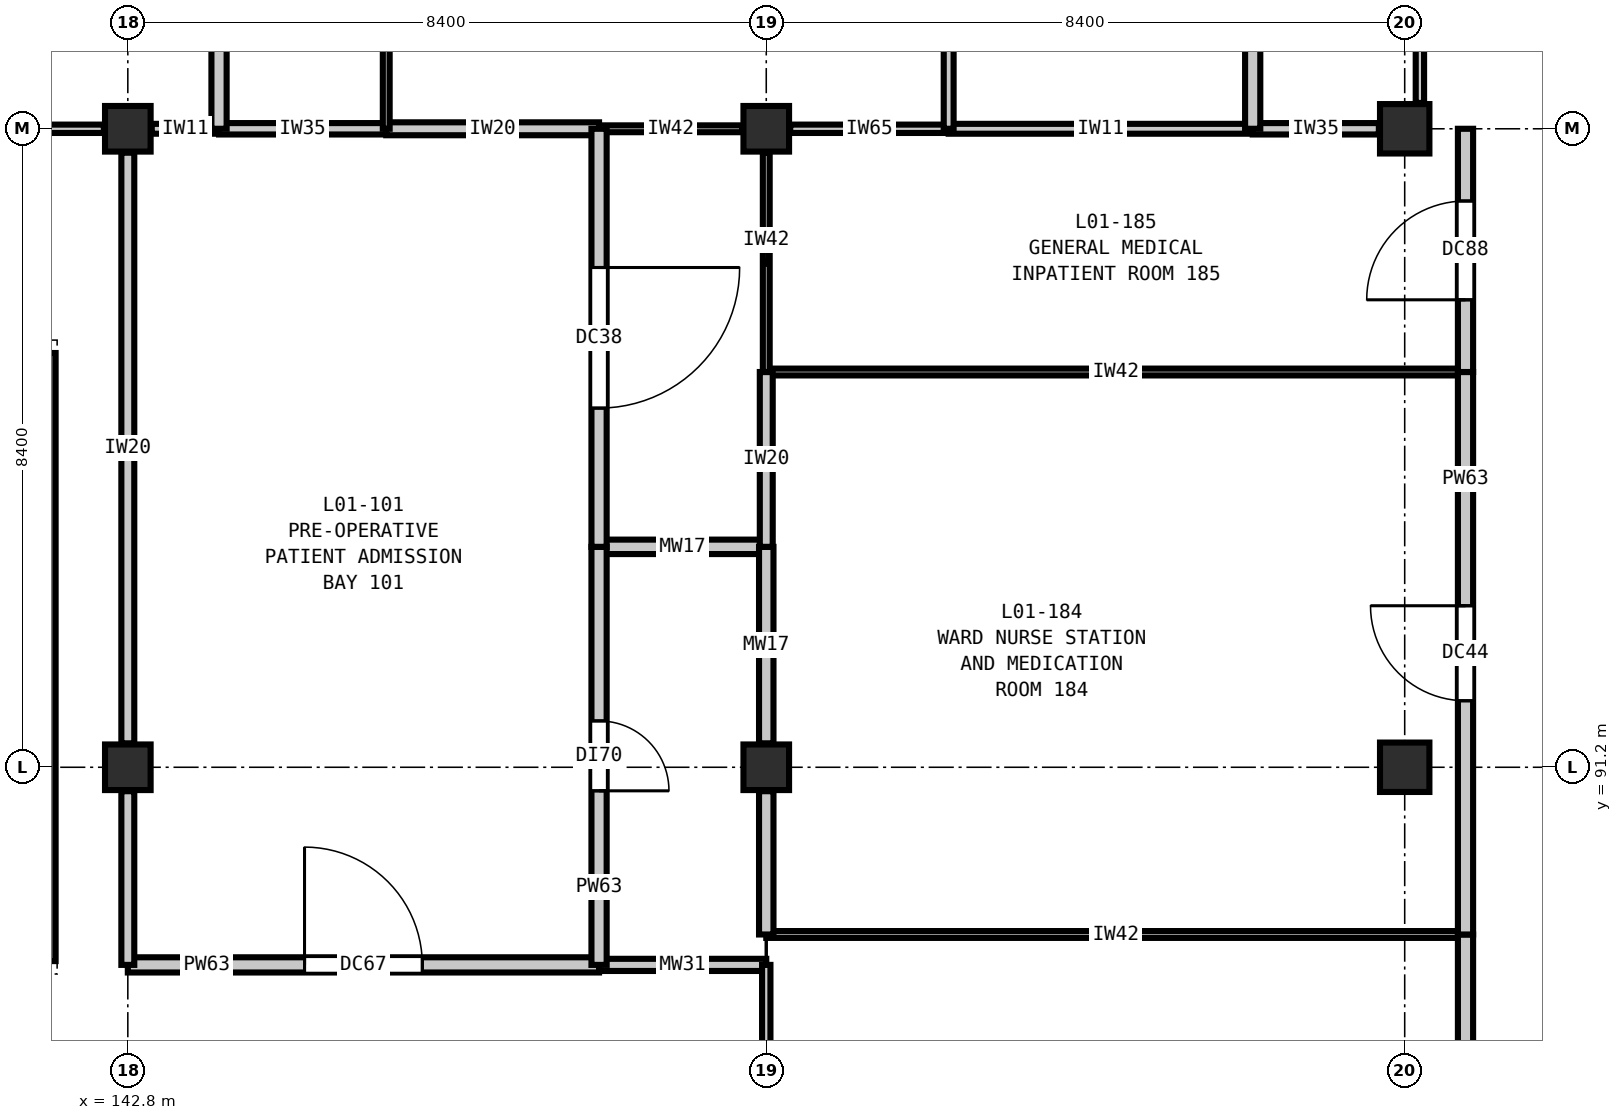
"""IFC4 building model, lengths in metres.
Left out: names, types, materials, properties, quantities, classifications, styles, units other than length and angle.
Written with IfcOpenShell. Run it as: python <this file> out.ifc"""

import sys

from ifc_helpers import new_model, si_unit, direction, frame, frame_2d, origin, origin_2d, place, context, subcontext, project, spatial, rectangle, extrude, element, fill, save


model = new_model("IFC4")
c1 = context("Model", 3, precision=1e-05, world=origin(), true_north=direction((0.0, 1.0)))
c2 = subcontext(c1, "Body", "Model", "MODEL_VIEW")
j1 = project(units=[si_unit("LENGTHUNIT", "METRE"), si_unit("PLANEANGLEUNIT", "RADIAN")], contexts=[c1])
p1 = place(None, origin())
s1 = spatial("IfcSite", under=j1, at=p1, CompositionType="ELEMENT")
p2 = place(p1, origin())
s2 = spatial("IfcBuilding", under=s1, at=p2, CompositionType="ELEMENT")
p3 = place(p2, frame((0.0, 0.0, 5.4)))
s3 = spatial("IfcBuildingStorey", under=s2, at=p3, CompositionType="ELEMENT", Elevation=5.4)
for number, where, z_axis, x_axis in (
    (1, (142.8, 91.2, 0.0), (0.0, 0.0, 1.0), (1.0, 0.0, 0.0)),
    (2, (142.8, 99.6, 0.0), (0.0, 0.0, 1.0), (1.0, 0.0, 0.0)),
    (3, (151.2, 91.2, 0.0), (0.0, 0.0, 1.0), (1.0, 0.0, 0.0)),
    (4, (151.2, 99.6, 0.0), (0.0, 0.0, 1.0), (1.0, 0.0, 0.0)),
):
    element("IfcColumn", number, at=place(p3, frame(where, z_axis=z_axis, x_axis=x_axis)), inside=s3, PredefinedType="COLUMN", context=c2, shape_type="SweptSolid", body=[
        extrude(rectangle(XDim=0.6, YDim=0.6, at=origin_2d()), origin(), (0.0, 0.0, 1.0), 5.4),
    ])
for number, where, z_axis, x_axis in (
    (5, (159.6, 91.2, 0.0), (0.0, 0.0, 1.0), (1.0, 0.0, 0.0)),
    (6, (159.6, 99.6, 0.0), (0.0, 0.0, 1.0), (1.0, 0.0, 0.0)),
):
    element("IfcColumn", number, at=place(p3, frame(where, z_axis=z_axis, x_axis=x_axis)), inside=s3, PredefinedType="COLUMN", context=c2, shape_type="SweptSolid", body=[
        extrude(rectangle(XDim=0.65, YDim=0.65, at=origin_2d()), origin(), (0.0, 0.0, 1.0), 5.4),
    ])
p4 = place(p3, frame((141.7, 88.65, 0.0), z_axis=(0.0, 0.0, 1.0), x_axis=(0.0, 1.0, 0.0)))
e7 = element("IfcWall", 7, at=p4, inside=s3, PredefinedType="SHEAR", context=c2, shape_type="SweptSolid", body=[
    extrude(rectangle(XDim=8.0, YDim=0.3, at=frame_2d((4.0, 0.0))), origin(), (0.0, 0.0, 1.0), 5.4),
])
p5 = place(p3, frame((142.8, 88.6, 0.0), z_axis=(0.0, 0.0, 1.0), x_axis=(1.0, 0.0, 0.0)))
e8 = element("IfcWall", 8, at=p5, inside=s3, PredefinedType="PARTITIONING", context=c2, shape_type="SweptSolid", body=[
    extrude(rectangle(XDim=6.2, YDim=0.2, at=frame_2d((3.1, 0.0))), origin(), (0.0, 0.0, 1.0), 5.05),
])
p6 = place(p5, frame((2.325, 0.0, 0.0)))
e9 = element("IfcOpeningElement", 9, at=p6, cuts=e8, PredefinedType="OPENING", context=c2, shape_type="SweptSolid", body=[
    extrude(rectangle(XDim=1.55, YDim=2.25, at=frame_2d((0.775, 1.125))), frame((0.0, 0.11, 0.0), z_axis=(0.0, -1.0, 0.0), x_axis=(1.0, 0.0, 0.0)), (0.0, 0.0, 1.0), 0.22),
])
p7 = place(p3, frame((149.0, 88.6, 0.0), z_axis=(0.0, 0.0, 1.0), x_axis=(1.0, 0.0, 0.0)))
e10 = element("IfcWall", 10, at=p7, inside=s3, PredefinedType="PLUMBINGWALL", context=c2, shape_type="SweptSolid", body=[
    extrude(rectangle(XDim=2.2, YDim=0.16, at=frame_2d((1.1, 0.0))), origin(), (0.0, 0.0, 1.0), 5.05),
])
p8 = place(p3, frame((151.2, 89.0, 0.0), z_axis=(0.0, 0.0, 1.0), x_axis=(1.0, 0.0, 0.0)))
e11 = element("IfcWall", 11, at=p8, inside=s3, PredefinedType="PARTITIONING", context=c2, shape_type="SweptSolid", body=[
    extrude(rectangle(XDim=9.2, YDim=0.09, at=frame_2d((4.6, 0.0))), origin(), (0.0, 0.0, 1.0), 5.05),
])
p9 = place(p3, frame((149.0, 94.1, 0.0), z_axis=(0.0, 0.0, 1.0), x_axis=(1.0, 0.0, 0.0)))
e12 = element("IfcWall", 12, at=p9, inside=s3, PredefinedType="PLUMBINGWALL", context=c2, shape_type="SweptSolid", body=[
    extrude(rectangle(XDim=2.2, YDim=0.19, at=frame_2d((1.1, 0.0))), origin(), (0.0, 0.0, 1.0), 5.05),
])
p10 = place(p3, frame((151.2, 96.4, 0.0), z_axis=(0.0, 0.0, 1.0), x_axis=(1.0, 0.0, 0.0)))
e13 = element("IfcWall", 13, at=p10, inside=s3, PredefinedType="PARTITIONING", context=c2, shape_type="SweptSolid", body=[
    extrude(rectangle(XDim=9.2, YDim=0.09, at=frame_2d((4.6, 0.0))), origin(), (0.0, 0.0, 1.0), 5.05),
])
p11 = place(p3, frame((140.0, 99.6, 0.0), z_axis=(0.0, 0.0, 1.0), x_axis=(1.0, 0.0, 0.0)))
e14 = element("IfcWall", 14, at=p11, inside=s3, PredefinedType="PARTITIONING", context=c2, shape_type="SweptSolid", body=[
    extrude(rectangle(XDim=2.485, YDim=0.11, at=frame_2d((1.243, 0.0))), origin(), (0.0, 0.0, 1.0), 4.685),
])
p12 = place(p3, frame((143.115, 99.6, 0.0), z_axis=(0.0, 0.0, 1.0), x_axis=(1.0, 0.0, 0.0)))
e15 = element("IfcWall", 15, at=p12, inside=s3, PredefinedType="PARTITIONING", context=c2, shape_type="SweptSolid", body=[
    extrude(rectangle(XDim=0.885, YDim=0.13, at=frame_2d((0.442, 0.0))), origin(), (0.0, 0.0, 1.0), 4.685),
])
p13 = place(p3, frame((144.0, 99.6, 0.0), z_axis=(0.0, 0.0, 1.0), x_axis=(1.0, 0.0, 0.0)))
e16 = element("IfcWall", 16, at=p13, inside=s3, PredefinedType="PARTITIONING", context=c2, shape_type="SweptSolid", body=[
    extrude(rectangle(XDim=2.2, YDim=0.15, at=frame_2d((1.1, 0.0))), origin(), (0.0, 0.0, 1.0), 4.685),
])
p14 = place(p3, frame((146.2, 99.6, 0.0), z_axis=(0.0, 0.0, 1.0), x_axis=(1.0, 0.0, 0.0)))
e17 = element("IfcWall", 17, at=p14, inside=s3, PredefinedType="PARTITIONING", context=c2, shape_type="SweptSolid", body=[
    extrude(rectangle(XDim=2.8, YDim=0.17, at=frame_2d((1.4, 0.0))), origin(), (0.0, 0.0, 1.0), 4.685),
])
p15 = place(p3, frame((149.0, 99.6, 0.0), z_axis=(0.0, 0.0, 1.0), x_axis=(1.0, 0.0, 0.0)))
e18 = element("IfcWall", 18, at=p15, inside=s3, PredefinedType="PARTITIONING", context=c2, shape_type="SweptSolid", body=[
    extrude(rectangle(XDim=1.885, YDim=0.09, at=frame_2d((0.942, 0.0))), origin(), (0.0, 0.0, 1.0), 4.685),
])
p16 = place(p3, frame((151.515, 99.6, 0.0), z_axis=(0.0, 0.0, 1.0), x_axis=(1.0, 0.0, 0.0)))
e19 = element("IfcWall", 19, at=p16, inside=s3, PredefinedType="PARTITIONING", context=c2, shape_type="SweptSolid", body=[
    extrude(rectangle(XDim=2.085, YDim=0.11, at=frame_2d((1.042, 0.0))), origin(), (0.0, 0.0, 1.0), 4.685),
])
p17 = place(p3, frame((153.6, 99.6, 0.0), z_axis=(0.0, 0.0, 1.0), x_axis=(1.0, 0.0, 0.0)))
e20 = element("IfcWall", 20, at=p17, inside=s3, PredefinedType="PARTITIONING", context=c2, shape_type="SweptSolid", body=[
    extrude(rectangle(XDim=4.0, YDim=0.13, at=frame_2d((2.0, 0.0))), origin(), (0.0, 0.0, 1.0), 4.685),
])
p18 = place(p3, frame((157.6, 99.6, 0.0), z_axis=(0.0, 0.0, 1.0), x_axis=(1.0, 0.0, 0.0)))
e21 = element("IfcWall", 21, at=p18, inside=s3, PredefinedType="PARTITIONING", context=c2, shape_type="SweptSolid", body=[
    extrude(rectangle(XDim=1.66, YDim=0.15, at=frame_2d((0.83, 0.0))), origin(), (0.0, 0.0, 1.0), 4.685),
])
p19 = place(p3, frame((142.8, 91.515, 0.0), z_axis=(0.0, 0.0, 1.0), x_axis=(0.0, 1.0, 0.0)))
e22 = element("IfcWall", 22, at=p19, inside=s3, PredefinedType="PARTITIONING", context=c2, shape_type="SweptSolid", body=[
    extrude(rectangle(XDim=7.77, YDim=0.17, at=frame_2d((3.885, 0.0))), origin(), (0.0, 0.0, 1.0), 4.735),
])
p20 = place(p3, frame((142.8, 88.6, 0.0), z_axis=(0.0, 0.0, 1.0), x_axis=(0.0, 1.0, 0.0)))
e23 = element("IfcWall", 23, at=p20, inside=s3, PredefinedType="PARTITIONING", context=c2, shape_type="SweptSolid", body=[
    extrude(rectangle(XDim=2.285, YDim=0.17, at=frame_2d((1.143, 0.0))), origin(), (0.0, 0.0, 1.0), 4.735),
])
p21 = place(p3, frame((144.0, 99.6, 0.0), z_axis=(0.0, 0.0, 1.0), x_axis=(0.0, 1.0, 0.0)))
e24 = element("IfcWall", 24, at=p21, inside=s3, PredefinedType="PARTITIONING", context=c2, shape_type="SweptSolid", body=[
    extrude(rectangle(XDim=6.8, YDim=0.2, at=frame_2d((3.4, 0.0))), origin(), (0.0, 0.0, 1.0), 5.05),
])
p22 = place(p21, frame((1.214, 0.0, 0.0)))
e25 = element("IfcOpeningElement", 25, at=p22, cuts=e24, PredefinedType="OPENING", context=c2, shape_type="SweptSolid", body=[
    extrude(rectangle(XDim=1.45, YDim=2.25, at=frame_2d((0.725, 1.125))), frame((0.0, 0.11, 0.0), z_axis=(0.0, -1.0, 0.0), x_axis=(1.0, 0.0, 0.0)), (0.0, 0.0, 1.0), 0.22),
])
p23 = place(p3, frame((146.2, 99.6, 0.0), z_axis=(0.0, 0.0, 1.0), x_axis=(0.0, 1.0, 0.0)))
e26 = element("IfcWall", 26, at=p23, inside=s3, PredefinedType="PARTITIONING", context=c2, shape_type="SweptSolid", body=[
    extrude(rectangle(XDim=6.8, YDim=0.09, at=frame_2d((3.4, 0.0))), origin(), (0.0, 0.0, 1.0), 5.05),
])
p24 = place(p3, frame((149.0, 88.6, 0.0), z_axis=(0.0, 0.0, 1.0), x_axis=(0.0, 1.0, 0.0)))
e27 = element("IfcWall", 27, at=p24, inside=s3, PredefinedType="PARTITIONING", context=c2, shape_type="SweptSolid", body=[
    extrude(rectangle(XDim=5.5, YDim=0.2, at=frame_2d((2.75, 0.0))), origin(), (0.0, 0.0, 1.0), 5.05),
])
p25 = place(p24, frame((2.29, 0.0, 0.0)))
e28 = element("IfcOpeningElement", 28, at=p25, cuts=e27, PredefinedType="OPENING", context=c2, shape_type="SweptSolid", body=[
    extrude(rectangle(XDim=0.92, YDim=2.1, at=frame_2d((0.46, 1.05))), frame((0.0, 0.11, 0.0), z_axis=(0.0, -1.0, 0.0), x_axis=(1.0, 0.0, 0.0)), (0.0, 0.0, 1.0), 0.22),
])
p26 = place(p3, frame((149.0, 94.1, 0.0), z_axis=(0.0, 0.0, 1.0), x_axis=(0.0, 1.0, 0.0)))
e29 = element("IfcWall", 29, at=p26, inside=s3, PredefinedType="PARTITIONING", context=c2, shape_type="SweptSolid", body=[
    extrude(rectangle(XDim=5.5, YDim=0.2, at=frame_2d((2.75, 0.0))), origin(), (0.0, 0.0, 1.0), 5.05),
])
p27 = place(p26, frame((1.825, 0.0, 0.0)))
e30 = element("IfcOpeningElement", 30, at=p27, cuts=e29, PredefinedType="OPENING", context=c2, shape_type="SweptSolid", body=[
    extrude(rectangle(XDim=1.85, YDim=2.3, at=frame_2d((0.925, 1.15))), frame((0.0, 0.11, 0.0), z_axis=(0.0, -1.0, 0.0), x_axis=(1.0, 0.0, 0.0)), (0.0, 0.0, 1.0), 0.22),
])
p28 = place(p3, frame((151.2, 85.8, 0.0), z_axis=(0.0, 0.0, 1.0), x_axis=(0.0, 1.0, 0.0)))
e31 = element("IfcWall", 31, at=p28, inside=s3, PredefinedType="PARTITIONING", context=c2, shape_type="SweptSolid", body=[
    extrude(rectangle(XDim=2.8, YDim=0.11, at=frame_2d((1.4, 0.0))), origin(), (0.0, 0.0, 1.0), 4.735),
])
p29 = place(p3, frame((151.2, 91.515, 0.0), z_axis=(0.0, 0.0, 1.0), x_axis=(0.0, 1.0, 0.0)))
e32 = element("IfcWall", 32, at=p29, inside=s3, PredefinedType="PLUMBINGWALL", context=c2, shape_type="SweptSolid", body=[
    extrude(rectangle(XDim=2.585, YDim=0.19, at=frame_2d((1.292, 0.0))), origin(), (0.0, 0.0, 1.0), 4.735),
])
p30 = place(p3, frame((151.2, 89.0, 0.0), z_axis=(0.0, 0.0, 1.0), x_axis=(0.0, 1.0, 0.0)))
e33 = element("IfcWall", 33, at=p30, inside=s3, PredefinedType="PLUMBINGWALL", context=c2, shape_type="SweptSolid", body=[
    extrude(rectangle(XDim=1.885, YDim=0.19, at=frame_2d((0.942, 0.0))), origin(), (0.0, 0.0, 1.0), 4.735),
])
p31 = place(p3, frame((151.2, 94.1, 0.0), z_axis=(0.0, 0.0, 1.0), x_axis=(0.0, 1.0, 0.0)))
e34 = element("IfcWall", 34, at=p31, inside=s3, PredefinedType="PARTITIONING", context=c2, shape_type="SweptSolid", body=[
    extrude(rectangle(XDim=2.3, YDim=0.17, at=frame_2d((1.15, 0.0))), origin(), (0.0, 0.0, 1.0), 4.735),
])
p32 = place(p3, frame((151.2, 96.4, 0.0), z_axis=(0.0, 0.0, 1.0), x_axis=(0.0, 1.0, 0.0)))
e35 = element("IfcWall", 35, at=p32, inside=s3, PredefinedType="PARTITIONING", context=c2, shape_type="SweptSolid", body=[
    extrude(rectangle(XDim=2.885, YDim=0.09, at=frame_2d((1.442, 0.0))), origin(), (0.0, 0.0, 1.0), 4.735),
])
p33 = place(p3, frame((153.6, 99.6, 0.0), z_axis=(0.0, 0.0, 1.0), x_axis=(0.0, 1.0, 0.0)))
e36 = element("IfcWall", 36, at=p33, inside=s3, PredefinedType="PARTITIONING", context=c2, shape_type="SweptSolid", body=[
    extrude(rectangle(XDim=13.6, YDim=0.13, at=frame_2d((6.8, 0.0))), origin(), (0.0, 0.0, 1.0), 5.05),
])
p34 = place(p3, frame((157.6, 99.6, 0.0), z_axis=(0.0, 0.0, 1.0), x_axis=(0.0, 1.0, 0.0)))
e37 = element("IfcWall", 37, at=p34, inside=s3, PredefinedType="PARTITIONING", context=c2, shape_type="SweptSolid", body=[
    extrude(rectangle(XDim=6.8, YDim=0.2, at=frame_2d((3.4, 0.0))), origin(), (0.0, 0.0, 1.0), 5.05),
])
p35 = place(p34, frame((2.775, 0.0, 0.0)))
e38 = element("IfcOpeningElement", 38, at=p35, cuts=e37, PredefinedType="OPENING", context=c2, shape_type="SweptSolid", body=[
    extrude(rectangle(XDim=1.25, YDim=2.15, at=frame_2d((0.625, 1.075))), frame((0.0, 0.11, 0.0), z_axis=(0.0, -1.0, 0.0), x_axis=(1.0, 0.0, 0.0)), (0.0, 0.0, 1.0), 0.22),
])
p36 = place(p3, frame((159.8, 99.94, 0.0), z_axis=(0.0, 0.0, 1.0), x_axis=(0.0, 1.0, 0.0)))
e39 = element("IfcWall", 39, at=p36, inside=s3, PredefinedType="PARTITIONING", context=c2, shape_type="SweptSolid", body=[
    extrude(rectangle(XDim=2.52, YDim=0.11, at=frame_2d((1.26, 0.0))), origin(), (0.0, 0.0, 1.0), 4.735),
])
p37 = place(p3, frame((160.4, 82.8, 0.0), z_axis=(0.0, 0.0, 1.0), x_axis=(0.0, 1.0, 0.0)))
e40 = element("IfcWall", 40, at=p37, inside=s3, PredefinedType="PARTITIONING", context=c2, shape_type="SweptSolid", body=[
    extrude(rectangle(XDim=6.2, YDim=0.2, at=frame_2d((3.1, 0.0))), origin(), (0.0, 0.0, 1.0), 5.05),
])
p38 = place(p37, frame((2.175, 0.0, 0.0)))
e41 = element("IfcOpeningElement", 41, at=p38, cuts=e40, PredefinedType="OPENING", context=c2, shape_type="SweptSolid", body=[
    extrude(rectangle(XDim=1.85, YDim=2.3, at=frame_2d((0.925, 1.15))), frame((0.0, 0.11, 0.0), z_axis=(0.0, -1.0, 0.0), x_axis=(1.0, 0.0, 0.0)), (0.0, 0.0, 1.0), 0.22),
])
p39 = place(p3, frame((160.4, 89.0, 0.0), z_axis=(0.0, 0.0, 1.0), x_axis=(0.0, 1.0, 0.0)))
e42 = element("IfcWall", 42, at=p39, inside=s3, PredefinedType="PARTITIONING", context=c2, shape_type="SweptSolid", body=[
    extrude(rectangle(XDim=7.4, YDim=0.2, at=frame_2d((3.7, 0.0))), origin(), (0.0, 0.0, 1.0), 5.05),
])
p40 = place(p39, frame((3.075, 0.0, 0.0)))
e43 = element("IfcOpeningElement", 43, at=p40, cuts=e42, PredefinedType="OPENING", context=c2, shape_type="SweptSolid", body=[
    extrude(rectangle(XDim=1.25, YDim=2.15, at=frame_2d((0.625, 1.075))), frame((0.0, 0.11, 0.0), z_axis=(0.0, -1.0, 0.0), x_axis=(1.0, 0.0, 0.0)), (0.0, 0.0, 1.0), 0.22),
])
p41 = place(p3, frame((160.4, 96.4, 0.0), z_axis=(0.0, 0.0, 1.0), x_axis=(0.0, 1.0, 0.0)))
e44 = element("IfcWall", 44, at=p41, inside=s3, PredefinedType="PARTITIONING", context=c2, shape_type="SweptSolid", body=[
    extrude(rectangle(XDim=3.2, YDim=0.2, at=frame_2d((1.6, 0.0))), origin(), (0.0, 0.0, 1.0), 5.05),
])
p42 = place(p41, frame((0.95, 0.0, 0.0)))
e45 = element("IfcOpeningElement", 45, at=p42, cuts=e44, PredefinedType="OPENING", context=c2, shape_type="SweptSolid", body=[
    extrude(rectangle(XDim=1.3, YDim=2.2, at=frame_2d((0.65, 1.1))), frame((0.0, 0.11, 0.0), z_axis=(0.0, -1.0, 0.0), x_axis=(1.0, 0.0, 0.0)), (0.0, 0.0, 1.0), 0.22),
])
p43 = place(p6, origin())
e46 = element("IfcDoor", 46, at=p43, inside=s3, OperationType="SINGLE_SWING_LEFT", PredefinedType="DOOR", context=c2, shape_type="SweptSolid", body=[
    extrude(rectangle(XDim=1.55, YDim=2.25, at=frame_2d((0.775, 1.125))), frame((0.0, 0.025, 0.0), z_axis=(0.0, -1.0, 0.0), x_axis=(1.0, 0.0, 0.0)), (0.0, 0.0, 1.0), 0.05),
])
fill(e9, e46)
p44 = place(p25, frame((0.92, 0.0, 0.0), z_axis=(0.0, 0.0, 1.0), x_axis=(-1.0, 0.0, 0.0)))
e47 = element("IfcDoor", 47, at=p44, inside=s3, OperationType="SINGLE_SWING_RIGHT", PredefinedType="DOOR", context=c2, shape_type="SweptSolid", body=[
    extrude(rectangle(XDim=0.92, YDim=2.1, at=frame_2d((0.46, 1.05))), frame((0.0, 0.025, 0.0), z_axis=(0.0, -1.0, 0.0), x_axis=(1.0, 0.0, 0.0)), (0.0, 0.0, 1.0), 0.05),
])
fill(e28, e47)
p45 = place(p27, frame((1.85, 0.0, 0.0), z_axis=(0.0, 0.0, 1.0), x_axis=(-1.0, 0.0, 0.0)))
e48 = element("IfcDoor", 48, at=p45, inside=s3, OperationType="SINGLE_SWING_LEFT", PredefinedType="DOOR", context=c2, shape_type="SweptSolid", body=[
    extrude(rectangle(XDim=1.85, YDim=2.3, at=frame_2d((0.925, 1.15))), frame((0.0, 0.025, 0.0), z_axis=(0.0, -1.0, 0.0), x_axis=(1.0, 0.0, 0.0)), (0.0, 0.0, 1.0), 0.05),
])
fill(e30, e48)
p46 = place(p40, origin())
e49 = element("IfcDoor", 49, at=p46, inside=s3, OperationType="SINGLE_SWING_RIGHT", PredefinedType="DOOR", context=c2, shape_type="SweptSolid", body=[
    extrude(rectangle(XDim=1.25, YDim=2.15, at=frame_2d((0.625, 1.075))), frame((0.0, 0.025, 0.0), z_axis=(0.0, -1.0, 0.0), x_axis=(1.0, 0.0, 0.0)), (0.0, 0.0, 1.0), 0.05),
])
fill(e43, e49)
p47 = place(p42, origin())
e50 = element("IfcDoor", 50, at=p47, inside=s3, OperationType="SINGLE_SWING_LEFT", PredefinedType="DOOR", context=c2, shape_type="SweptSolid", body=[
    extrude(rectangle(XDim=1.3, YDim=2.2, at=frame_2d((0.65, 1.1))), frame((0.0, 0.025, 0.0), z_axis=(0.0, -1.0, 0.0), x_axis=(1.0, 0.0, 0.0)), (0.0, 0.0, 1.0), 0.05),
])
fill(e45, e50)
save(model, sys.argv[1])
